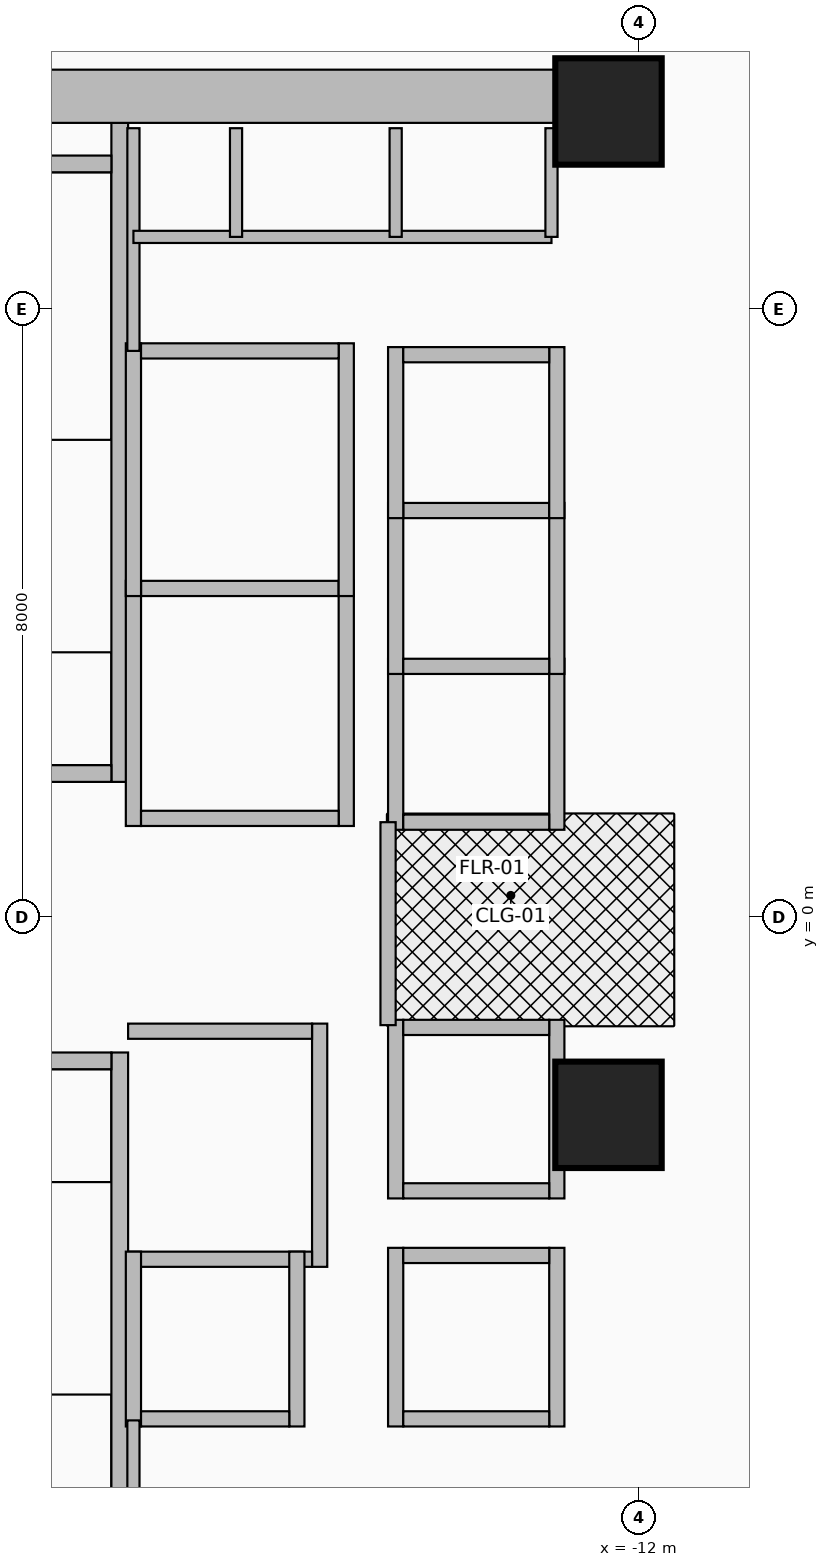
"""IFC4 building model, lengths in metres.
Left out: names, types, materials, properties, quantities, classifications, styles, units other than length and angle.
Written with IfcOpenShell. Run it as: python <this file> out.ifc"""

import sys

from ifc_helpers import new_model, si_unit, direction, frame, frame_2d, origin, origin_2d, place, context, subcontext, project, spatial, rectangle, extrude, source, transform, mapped, element, fill, save


model = new_model("IFC4")
c1 = context("Model", 3, precision=1e-05, world=origin(), true_north=direction((0.0, 1.0)))
c2 = subcontext(c1, "Body", "Model", "MODEL_VIEW")
j1 = project(units=[si_unit("LENGTHUNIT", "METRE"), si_unit("PLANEANGLEUNIT", "RADIAN")], contexts=[c1])
p1 = place(None, origin())
s1 = spatial("IfcSite", under=j1, at=p1, CompositionType="ELEMENT")
p2 = place(p1, origin())
s2 = spatial("IfcBuilding", under=s1, at=p2, CompositionType="ELEMENT")
p3 = place(p2, frame((0.0, 0.0, 26.0)))
s3 = spatial("IfcBuildingStorey", under=s2, at=p3, CompositionType="ELEMENT", Elevation=26.0)
p4 = place(p3, frame((-18.83, 1.78, 0.0), z_axis=(0.0, 0.0, 1.0), x_axis=(0.0, 1.0, 0.0)))
e1 = element("IfcWall", 1, at=p4, inside=s3, PredefinedType="SHEAR", context=c2, shape_type="SweptSolid", body=[
    extrude(rectangle(XDim=8.67, YDim=0.22, at=frame_2d((4.335, 0.0))), origin(), (0.0, 0.0, 1.0), 3.46),
])
p5 = place(p3, frame((-22.05, 1.89, 0.0), z_axis=(0.0, 0.0, 1.0), x_axis=(1.0, 0.0, 0.0)))
e2 = element("IfcWall", 2, at=p5, inside=s3, PredefinedType="SHEAR", context=c2, shape_type="SweptSolid", body=[
    extrude(rectangle(XDim=3.11, YDim=0.22, at=frame_2d((1.555, 0.0))), origin(), (0.0, 0.0, 1.0), 3.46),
])
p6 = place(p5, frame((1.0, 0.0, 0.0)))
e3 = element("IfcOpeningElement", 3, at=p6, cuts=e2, PredefinedType="OPENING", context=c2, shape_type="SweptSolid", body=[
    extrude(rectangle(XDim=1.1, YDim=2.15, at=frame_2d((0.55, 1.075))), frame((0.0, 0.125, 0.0), z_axis=(0.0, -1.0, 0.0), x_axis=(1.0, 0.0, 0.0)), (0.0, 0.0, 1.0), 0.25),
])
p7 = place(p3, frame((-22.05, 9.91, 0.0), z_axis=(0.0, 0.0, 1.0), x_axis=(1.0, 0.0, 0.0)))
e4 = element("IfcWall", 4, at=p7, inside=s3, PredefinedType="SHEAR", context=c2, shape_type="SweptSolid", body=[
    extrude(rectangle(XDim=3.11, YDim=0.22, at=frame_2d((1.555, 0.0))), origin(), (0.0, 0.0, 1.0), 3.46),
])
p8 = place(p3, frame((-18.83, -10.45, 0.0), z_axis=(0.0, 0.0, 1.0), x_axis=(0.0, 1.0, 0.0)))
e5 = element("IfcWall", 5, at=p8, inside=s3, PredefinedType="SHEAR", context=c2, shape_type="SweptSolid", body=[
    extrude(rectangle(XDim=8.67, YDim=0.22, at=frame_2d((4.335, 0.0))), origin(), (0.0, 0.0, 1.0), 3.46),
])
p9 = place(p3, frame((-22.05, -1.89, 0.0), z_axis=(0.0, 0.0, 1.0), x_axis=(1.0, 0.0, 0.0)))
e6 = element("IfcWall", 6, at=p9, inside=s3, PredefinedType="SHEAR", context=c2, shape_type="SweptSolid", body=[
    extrude(rectangle(XDim=3.11, YDim=0.22, at=frame_2d((1.555, 0.0))), origin(), (0.0, 0.0, 1.0), 3.46),
])
p10 = place(p9, frame((1.0, 0.0, 0.0)))
e7 = element("IfcOpeningElement", 7, at=p10, cuts=e6, PredefinedType="OPENING", context=c2, shape_type="SweptSolid", body=[
    extrude(rectangle(XDim=1.1, YDim=2.15, at=frame_2d((0.55, 1.075))), frame((0.0, 0.125, 0.0), z_axis=(0.0, -1.0, 0.0), x_axis=(1.0, 0.0, 0.0)), (0.0, 0.0, 1.0), 0.25),
])
p11 = place(p3, frame((-22.65, 10.8, 0.0), z_axis=(0.0, 0.0, 1.0), x_axis=(1.0, 0.0, 0.0)))
e8 = element("IfcWall", 8, at=p11, inside=s3, PredefinedType="SHEAR", context=c2, shape_type="SweptSolid", body=[
    extrude(rectangle(XDim=10.25, YDim=0.7, at=frame_2d((5.125, 0.0))), origin(), (0.0, 0.0, 1.0), 3.46),
])
m1 = source(origin(), c2, "Body", "SweptSolid", [
    extrude(rectangle(XDim=1.4, YDim=1.4, at=origin_2d()), origin(), (0.0, 0.0, 1.0), 3.7),
])
for number, where, z_axis, x_axis in (
    (9, (-12.4, -2.6, 0.0), (0.0, 0.0, 1.0), (1.0, 0.0, 0.0)),
    (10, (-12.4, 10.6, 0.0), (0.0, 0.0, 1.0), (1.0, 0.0, 0.0)),
):
    element("IfcColumn", number, at=place(p3, frame(where, z_axis=z_axis, x_axis=x_axis)), inside=s3, PredefinedType="COLUMN", context=c2, shape_type="MappedRepresentation", body=[
        mapped(m1, transform((0.0, 0.0, 0.0), x_axis=(1.0, 0.0, 0.0), y_axis=(0.0, 1.0, 0.0), z_axis=(0.0, 0.0, 1.0), scale=1.0)),
    ])
for number, where, z_axis, x_axis in (
    (11, (-18.65, 1.2, 0.0), (0.0, 0.0, 1.0), (0.0, 1.0, 0.0)),
    (12, (-15.85, 1.2, 0.0), (0.0, 0.0, 1.0), (0.0, 1.0, 0.0)),
):
    element("IfcWall", number, at=place(p3, frame(where, z_axis=z_axis, x_axis=x_axis)), inside=s3, PredefinedType="MOVABLE", context=c2, shape_type="SweptSolid", body=[
        extrude(rectangle(XDim=3.225, YDim=0.2, at=frame_2d((1.613, 0.0))), origin(), (0.0, 0.0, 1.0), 3.46),
    ])
p12 = place(p3, frame((-18.55, 1.3, 0.0), z_axis=(0.0, 0.0, 1.0), x_axis=(1.0, 0.0, 0.0)))
e13 = element("IfcWall", 13, at=p12, inside=s3, PredefinedType="MOVABLE", context=c2, shape_type="SweptSolid", body=[
    extrude(rectangle(XDim=2.6, YDim=0.2, at=frame_2d((1.3, 0.0))), origin(), (0.0, 0.0, 1.0), 3.46),
])
p13 = place(p12, frame((0.7, 0.0, 0.0)))
e14 = element("IfcOpeningElement", 14, at=p13, cuts=e13, PredefinedType="OPENING", context=c2, shape_type="SweptSolid", body=[
    extrude(rectangle(XDim=1.2, YDim=2.1, at=frame_2d((0.6, 1.05))), frame((0.0, 0.115, 0.0), z_axis=(0.0, -1.0, 0.0), x_axis=(1.0, 0.0, 0.0)), (0.0, 0.0, 1.0), 0.23),
])
p14 = place(p3, frame((-18.55, 4.325, 0.0), z_axis=(0.0, 0.0, 1.0), x_axis=(1.0, 0.0, 0.0)))
e15 = element("IfcWall", 15, at=p14, inside=s3, PredefinedType="MOVABLE", context=c2, shape_type="SweptSolid", body=[
    extrude(rectangle(XDim=2.6, YDim=0.2, at=frame_2d((1.3, 0.0))), origin(), (0.0, 0.0, 1.0), 3.46),
])
p15 = place(p3, frame((-16.2, -4.6, 0.0), z_axis=(0.0, 0.0, 1.0), x_axis=(0.0, 1.0, 0.0)))
e16 = element("IfcWall", 16, at=p15, inside=s3, PredefinedType="MOVABLE", context=c2, shape_type="SweptSolid", body=[
    extrude(rectangle(XDim=3.2, YDim=0.2, at=frame_2d((1.6, 0.0))), origin(), (0.0, 0.0, 1.0), 3.46),
])
p16 = place(p3, frame((-18.72, -4.5, 0.0), z_axis=(0.0, 0.0, 1.0), x_axis=(1.0, 0.0, 0.0)))
e17 = element("IfcWall", 17, at=p16, inside=s3, PredefinedType="MOVABLE", context=c2, shape_type="SweptSolid", body=[
    extrude(rectangle(XDim=2.42, YDim=0.2, at=frame_2d((1.21, 0.0))), origin(), (0.0, 0.0, 1.0), 3.46),
])
p17 = place(p3, frame((-18.72, -1.5, 0.0), z_axis=(0.0, 0.0, 1.0), x_axis=(1.0, 0.0, 0.0)))
e18 = element("IfcWall", 18, at=p17, inside=s3, PredefinedType="MOVABLE", context=c2, shape_type="SweptSolid", body=[
    extrude(rectangle(XDim=2.42, YDim=0.2, at=frame_2d((1.21, 0.0))), origin(), (0.0, 0.0, 1.0), 3.46),
])
p18 = place(p17, frame((0.61, 0.0, 0.0)))
e19 = element("IfcOpeningElement", 19, at=p18, cuts=e18, PredefinedType="OPENING", context=c2, shape_type="SweptSolid", body=[
    extrude(rectangle(XDim=1.2, YDim=2.1, at=frame_2d((0.6, 1.05))), frame((0.0, 0.115, 0.0), z_axis=(0.0, -1.0, 0.0), x_axis=(1.0, 0.0, 0.0)), (0.0, 0.0, 1.0), 0.23),
])
for number, where, z_axis, x_axis in (
    (20, (-18.65, 4.225, 0.0), (0.0, 0.0, 1.0), (0.0, 1.0, 0.0)),
    (21, (-15.85, 4.225, 0.0), (0.0, 0.0, 1.0), (0.0, 1.0, 0.0)),
):
    element("IfcWall", number, at=place(p3, frame(where, z_axis=z_axis, x_axis=x_axis)), inside=s3, PredefinedType="MOVABLE", context=c2, shape_type="SweptSolid", body=[
        extrude(rectangle(XDim=3.325, YDim=0.2, at=frame_2d((1.663, 0.0))), origin(), (0.0, 0.0, 1.0), 3.46),
    ])
p19 = place(p3, frame((-18.55, 7.45, 0.0), z_axis=(0.0, 0.0, 1.0), x_axis=(1.0, 0.0, 0.0)))
e22 = element("IfcWall", 22, at=p19, inside=s3, PredefinedType="MOVABLE", context=c2, shape_type="SweptSolid", body=[
    extrude(rectangle(XDim=2.6, YDim=0.2, at=frame_2d((1.3, 0.0))), origin(), (0.0, 0.0, 1.0), 3.46),
])
p20 = place(p19, frame((0.7, 0.0, 0.0)))
e23 = element("IfcOpeningElement", 23, at=p20, cuts=e22, PredefinedType="OPENING", context=c2, shape_type="SweptSolid", body=[
    extrude(rectangle(XDim=1.2, YDim=2.1, at=frame_2d((0.6, 1.05))), frame((0.0, 0.115, 0.0), z_axis=(0.0, -1.0, 0.0), x_axis=(1.0, 0.0, 0.0)), (0.0, 0.0, 1.0), 0.23),
])
for number, where, z_axis, x_axis in (
    (24, (-15.2, -6.7, 0.0), (0.0, 0.0, 1.0), (0.0, 1.0, 0.0)),
    (25, (-13.08, -6.7, 0.0), (0.0, 0.0, 1.0), (0.0, 1.0, 0.0)),
):
    element("IfcWall", number, at=place(p3, frame(where, z_axis=z_axis, x_axis=x_axis)), inside=s3, PredefinedType="MOVABLE", context=c2, shape_type="SweptSolid", body=[
        extrude(rectangle(XDim=2.35, YDim=0.2, at=frame_2d((1.175, 0.0))), origin(), (0.0, 0.0, 1.0), 3.46),
    ])
p21 = place(p3, frame((-15.1, -6.6, 0.0), z_axis=(0.0, 0.0, 1.0), x_axis=(1.0, 0.0, 0.0)))
e26 = element("IfcWall", 26, at=p21, inside=s3, PredefinedType="MOVABLE", context=c2, shape_type="SweptSolid", body=[
    extrude(rectangle(XDim=1.92, YDim=0.2, at=frame_2d((0.96, 0.0))), origin(), (0.0, 0.0, 1.0), 3.46),
])
p22 = place(p21, frame((0.41, 0.0, 0.0)))
e27 = element("IfcOpeningElement", 27, at=p22, cuts=e26, PredefinedType="OPENING", context=c2, shape_type="SweptSolid", body=[
    extrude(rectangle(XDim=1.1, YDim=2.1, at=frame_2d((0.55, 1.05))), frame((0.0, 0.115, 0.0), z_axis=(0.0, -1.0, 0.0), x_axis=(1.0, 0.0, 0.0)), (0.0, 0.0, 1.0), 0.23),
])
p23 = place(p3, frame((-15.1, -4.45, 0.0), z_axis=(0.0, 0.0, 1.0), x_axis=(1.0, 0.0, 0.0)))
e28 = element("IfcWall", 28, at=p23, inside=s3, PredefinedType="MOVABLE", context=c2, shape_type="SweptSolid", body=[
    extrude(rectangle(XDim=1.92, YDim=0.2, at=frame_2d((0.96, 0.0))), origin(), (0.0, 0.0, 1.0), 3.46),
])
for number, where, z_axis, x_axis in (
    (29, (-15.2, 1.15, 0.0), (0.0, 0.0, 1.0), (0.0, 1.0, 0.0)),
    (30, (-13.08, 1.15, 0.0), (0.0, 0.0, 1.0), (0.0, 1.0, 0.0)),
):
    element("IfcWall", number, at=place(p3, frame(where, z_axis=z_axis, x_axis=x_axis)), inside=s3, PredefinedType="MOVABLE", context=c2, shape_type="SweptSolid", body=[
        extrude(rectangle(XDim=2.25, YDim=0.2, at=frame_2d((1.125, 0.0))), origin(), (0.0, 0.0, 1.0), 3.46),
    ])
p24 = place(p3, frame((-15.1, 1.25, 0.0), z_axis=(0.0, 0.0, 1.0), x_axis=(1.0, 0.0, 0.0)))
e31 = element("IfcWall", 31, at=p24, inside=s3, PredefinedType="MOVABLE", context=c2, shape_type="SweptSolid", body=[
    extrude(rectangle(XDim=1.92, YDim=0.2, at=frame_2d((0.96, 0.0))), origin(), (0.0, 0.0, 1.0), 3.46),
])
for number, where, z_axis, x_axis in (
    (32, (-15.2, 3.2, 0.0), (0.0, 0.0, 1.0), (0.0, 1.0, 0.0)),
    (33, (-13.08, 3.2, 0.0), (0.0, 0.0, 1.0), (0.0, 1.0, 0.0)),
):
    element("IfcWall", number, at=place(p3, frame(where, z_axis=z_axis, x_axis=x_axis)), inside=s3, PredefinedType="MOVABLE", context=c2, shape_type="SweptSolid", body=[
        extrude(rectangle(XDim=2.25, YDim=0.2, at=frame_2d((1.125, 0.0))), origin(), (0.0, 0.0, 1.0), 3.46),
    ])
for number, where, z_axis, x_axis in (
    (34, (-15.1, 3.3, 0.0), (0.0, 0.0, 1.0), (1.0, 0.0, 0.0)),
    (35, (-15.1, 5.35, 0.0), (0.0, 0.0, 1.0), (1.0, 0.0, 0.0)),
):
    element("IfcWall", number, at=place(p3, frame(where, z_axis=z_axis, x_axis=x_axis)), inside=s3, PredefinedType="MOVABLE", context=c2, shape_type="SweptSolid", body=[
        extrude(rectangle(XDim=1.92, YDim=0.2, at=frame_2d((0.96, 0.0))), origin(), (0.0, 0.0, 1.0), 3.46),
    ])
for number, where, z_axis, x_axis in (
    (36, (-15.2, 5.25, 0.0), (0.0, 0.0, 1.0), (0.0, 1.0, 0.0)),
    (37, (-13.08, 5.25, 0.0), (0.0, 0.0, 1.0), (0.0, 1.0, 0.0)),
):
    element("IfcWall", number, at=place(p3, frame(where, z_axis=z_axis, x_axis=x_axis)), inside=s3, PredefinedType="MOVABLE", context=c2, shape_type="SweptSolid", body=[
        extrude(rectangle(XDim=2.25, YDim=0.2, at=frame_2d((1.125, 0.0))), origin(), (0.0, 0.0, 1.0), 3.46),
    ])
p25 = place(p3, frame((-15.1, 7.4, 0.0), z_axis=(0.0, 0.0, 1.0), x_axis=(1.0, 0.0, 0.0)))
e38 = element("IfcWall", 38, at=p25, inside=s3, PredefinedType="MOVABLE", context=c2, shape_type="SweptSolid", body=[
    extrude(rectangle(XDim=1.92, YDim=0.2, at=frame_2d((0.96, 0.0))), origin(), (0.0, 0.0, 1.0), 3.46),
])
for number, where, z_axis, x_axis in (
    (39, (-18.65, -6.7, 0.0), (0.0, 0.0, 1.0), (0.0, 1.0, 0.0)),
    (40, (-16.5, -6.7, 0.0), (0.0, 0.0, 1.0), (0.0, 1.0, 0.0)),
):
    element("IfcWall", number, at=place(p3, frame(where, z_axis=z_axis, x_axis=x_axis)), inside=s3, PredefinedType="MOVABLE", context=c2, shape_type="SweptSolid", body=[
        extrude(rectangle(XDim=2.3, YDim=0.2, at=frame_2d((1.15, 0.0))), origin(), (0.0, 0.0, 1.0), 3.46),
    ])
p26 = place(p3, frame((-18.55, -6.6, 0.0), z_axis=(0.0, 0.0, 1.0), x_axis=(1.0, 0.0, 0.0)))
e41 = element("IfcWall", 41, at=p26, inside=s3, PredefinedType="MOVABLE", context=c2, shape_type="SweptSolid", body=[
    extrude(rectangle(XDim=1.95, YDim=0.2, at=frame_2d((0.975, 0.0))), origin(), (0.0, 0.0, 1.0), 3.46),
])
for number, where, z_axis, x_axis in (
    (42, (-15.2, -3.7, 0.0), (0.0, 0.0, 1.0), (0.0, 1.0, 0.0)),
    (43, (-13.08, -3.7, 0.0), (0.0, 0.0, 1.0), (0.0, 1.0, 0.0)),
):
    element("IfcWall", number, at=place(p3, frame(where, z_axis=z_axis, x_axis=x_axis)), inside=s3, PredefinedType="MOVABLE", context=c2, shape_type="SweptSolid", body=[
        extrude(rectangle(XDim=2.35, YDim=0.2, at=frame_2d((1.175, 0.0))), origin(), (0.0, 0.0, 1.0), 3.46),
    ])
for number, where, z_axis, x_axis in (
    (44, (-15.1, -3.6, 0.0), (0.0, 0.0, 1.0), (1.0, 0.0, 0.0)),
    (45, (-15.1, -1.45, 0.0), (0.0, 0.0, 1.0), (1.0, 0.0, 0.0)),
):
    element("IfcWall", number, at=place(p3, frame(where, z_axis=z_axis, x_axis=x_axis)), inside=s3, PredefinedType="MOVABLE", context=c2, shape_type="SweptSolid", body=[
        extrude(rectangle(XDim=1.92, YDim=0.2, at=frame_2d((0.96, 0.0))), origin(), (0.0, 0.0, 1.0), 3.46),
    ])
p27 = place(p3, frame((-15.3, -1.42, 0.0), z_axis=(0.0, 0.0, 1.0), x_axis=(0.0, 1.0, 0.0)))
e46 = element("IfcWall", 46, at=p27, inside=s3, PredefinedType="PARTITIONING", context=c2, shape_type="SweptSolid", body=[
    extrude(rectangle(XDim=2.67, YDim=0.2, at=frame_2d((1.335, 0.0))), origin(), (0.0, 0.0, 1.0), 3.46),
])
p28 = place(p27, frame((0.78, 0.0, 0.0)))
e47 = element("IfcOpeningElement", 47, at=p28, cuts=e46, PredefinedType="OPENING", context=c2, shape_type="SweptSolid", body=[
    extrude(rectangle(XDim=1.05, YDim=2.15, at=frame_2d((0.525, 1.075))), frame((0.0, 0.115, 0.0), z_axis=(0.0, -1.0, 0.0), x_axis=(1.0, 0.0, 0.0)), (0.0, 0.0, 1.0), 0.23),
])
p29 = place(p3, frame((-18.65, 7.45, 0.0), z_axis=(0.0, 0.0, 1.0), x_axis=(0.0, 1.0, 0.0)))
e48 = element("IfcWall", 48, at=p29, inside=s3, PredefinedType="PARTITIONING", context=c2, shape_type="SweptSolid", body=[
    extrude(rectangle(XDim=2.93, YDim=0.16, at=frame_2d((1.465, 0.0))), origin(), (0.0, 0.0, 1.0), 3.46),
])
p30 = place(p3, frame((-18.65, -8.18, 0.0), z_axis=(0.0, 0.0, 1.0), x_axis=(0.0, 1.0, 0.0)))
e49 = element("IfcWall", 49, at=p30, inside=s3, PredefinedType="PARTITIONING", context=c2, shape_type="SweptSolid", body=[
    extrude(rectangle(XDim=1.56, YDim=0.16, at=frame_2d((0.78, 0.0))), origin(), (0.0, 0.0, 1.0), 3.46),
])
p31 = place(p3, frame((-18.65, 8.95, 0.0), z_axis=(0.0, 0.0, 1.0), x_axis=(1.0, 0.0, 0.0)))
e50 = element("IfcWall", 50, at=p31, inside=s3, PredefinedType="PARTITIONING", context=c2, shape_type="SweptSolid", body=[
    extrude(rectangle(XDim=5.5, YDim=0.16, at=frame_2d((2.75, 0.0))), origin(), (0.0, 0.0, 1.0), 3.46),
])
p32 = place(p31, frame((0.3, 0.0, 0.0)))
e51 = element("IfcOpeningElement", 51, at=p32, cuts=e50, PredefinedType="OPENING", context=c2, shape_type="SweptSolid", body=[
    extrude(rectangle(XDim=0.85, YDim=2.05, at=frame_2d((0.425, 1.025))), frame((0.0, 0.095, 0.0), z_axis=(0.0, -1.0, 0.0), x_axis=(1.0, 0.0, 0.0)), (0.0, 0.0, 1.0), 0.19),
])
p33 = place(p31, frame((1.85, 0.0, 0.0)))
e52 = element("IfcOpeningElement", 52, at=p33, cuts=e50, PredefinedType="OPENING", context=c2, shape_type="SweptSolid", body=[
    extrude(rectangle(XDim=0.85, YDim=2.05, at=frame_2d((0.425, 1.025))), frame((0.0, 0.095, 0.0), z_axis=(0.0, -1.0, 0.0), x_axis=(1.0, 0.0, 0.0)), (0.0, 0.0, 1.0), 0.19),
])
p34 = place(p31, frame((3.9, 0.0, 0.0)))
e53 = element("IfcOpeningElement", 53, at=p34, cuts=e50, PredefinedType="OPENING", context=c2, shape_type="SweptSolid", body=[
    extrude(rectangle(XDim=0.85, YDim=2.05, at=frame_2d((0.425, 1.025))), frame((0.0, 0.095, 0.0), z_axis=(0.0, -1.0, 0.0), x_axis=(1.0, 0.0, 0.0)), (0.0, 0.0, 1.0), 0.19),
])
for number, where, z_axis, x_axis in (
    (54, (-13.15, 8.95, 0.0), (0.0, 0.0, 1.0), (0.0, 1.0, 0.0)),
    (55, (-17.3, 8.95, 0.0), (0.0, 0.0, 1.0), (0.0, 1.0, 0.0)),
    (56, (-15.2, 8.95, 0.0), (0.0, 0.0, 1.0), (0.0, 1.0, 0.0)),
):
    element("IfcWall", number, at=place(p3, frame(where, z_axis=z_axis, x_axis=x_axis)), inside=s3, PredefinedType="PARTITIONING", context=c2, shape_type="SweptSolid", body=[
        extrude(rectangle(XDim=1.43, YDim=0.16, at=frame_2d((0.715, 0.0))), origin(), (0.0, 0.0, 1.0), 3.46),
    ])
p35 = place(p13, origin())
e57 = element("IfcDoor", 57, at=p35, inside=s3, OperationType="DOUBLE_DOOR_SLIDING", PredefinedType="DOOR", context=c2, shape_type="SweptSolid", body=[
    extrude(rectangle(XDim=1.2, YDim=2.1, at=frame_2d((0.6, 1.05))), frame((0.0, 0.025, 0.0), z_axis=(0.0, -1.0, 0.0), x_axis=(1.0, 0.0, 0.0)), (0.0, 0.0, 1.0), 0.05),
])
fill(e14, e57)
p36 = place(p18, origin())
e58 = element("IfcDoor", 58, at=p36, inside=s3, OperationType="DOUBLE_DOOR_SLIDING", PredefinedType="DOOR", context=c2, shape_type="SweptSolid", body=[
    extrude(rectangle(XDim=1.2, YDim=2.1, at=frame_2d((0.6, 1.05))), frame((0.0, 0.025, 0.0), z_axis=(0.0, -1.0, 0.0), x_axis=(1.0, 0.0, 0.0)), (0.0, 0.0, 1.0), 0.05),
])
fill(e19, e58)
p37 = place(p20, origin())
e59 = element("IfcDoor", 59, at=p37, inside=s3, OperationType="DOUBLE_DOOR_SLIDING", PredefinedType="DOOR", context=c2, shape_type="SweptSolid", body=[
    extrude(rectangle(XDim=1.2, YDim=2.1, at=frame_2d((0.6, 1.05))), frame((0.0, 0.025, 0.0), z_axis=(0.0, -1.0, 0.0), x_axis=(1.0, 0.0, 0.0)), (0.0, 0.0, 1.0), 0.05),
])
fill(e23, e59)
p38 = place(p22, origin())
e60 = element("IfcDoor", 60, at=p38, inside=s3, OperationType="DOUBLE_DOOR_SLIDING", PredefinedType="DOOR", context=c2, shape_type="SweptSolid", body=[
    extrude(rectangle(XDim=1.1, YDim=2.1, at=frame_2d((0.55, 1.05))), frame((0.0, 0.025, 0.0), z_axis=(0.0, -1.0, 0.0), x_axis=(1.0, 0.0, 0.0)), (0.0, 0.0, 1.0), 0.05),
])
fill(e27, e60)
p39 = place(p28, origin())
e61 = element("IfcDoor", 61, at=p39, inside=s3, OperationType="SINGLE_SWING_RIGHT", PredefinedType="DOOR", context=c2, shape_type="SweptSolid", body=[
    extrude(rectangle(XDim=1.05, YDim=2.15, at=frame_2d((0.525, 1.075))), frame((0.0, 0.025, 0.0), z_axis=(0.0, -1.0, 0.0), x_axis=(1.0, 0.0, 0.0)), (0.0, 0.0, 1.0), 0.05),
])
fill(e47, e61)
p40 = place(p32, origin())
e62 = element("IfcDoor", 62, at=p40, inside=s3, OperationType="SINGLE_SWING_LEFT", PredefinedType="DOOR", context=c2, shape_type="SweptSolid", body=[
    extrude(rectangle(XDim=0.85, YDim=2.05, at=frame_2d((0.425, 1.025))), frame((0.0, 0.025, 0.0), z_axis=(0.0, -1.0, 0.0), x_axis=(1.0, 0.0, 0.0)), (0.0, 0.0, 1.0), 0.05),
])
fill(e51, e62)
p41 = place(p33, origin())
e63 = element("IfcDoor", 63, at=p41, inside=s3, OperationType="SINGLE_SWING_RIGHT", PredefinedType="DOOR", context=c2, shape_type="SweptSolid", body=[
    extrude(rectangle(XDim=0.85, YDim=2.05, at=frame_2d((0.425, 1.025))), frame((0.0, 0.025, 0.0), z_axis=(0.0, -1.0, 0.0), x_axis=(1.0, 0.0, 0.0)), (0.0, 0.0, 1.0), 0.05),
])
fill(e52, e63)
p42 = place(p34, origin())
e64 = element("IfcDoor", 64, at=p42, inside=s3, OperationType="SINGLE_SWING_LEFT", PredefinedType="DOOR", context=c2, shape_type="SweptSolid", body=[
    extrude(rectangle(XDim=0.85, YDim=2.05, at=frame_2d((0.425, 1.025))), frame((0.0, 0.025, 0.0), z_axis=(0.0, -1.0, 0.0), x_axis=(1.0, 0.0, 0.0)), (0.0, 0.0, 1.0), 0.05),
])
fill(e53, e64)
save(model, sys.argv[1])
